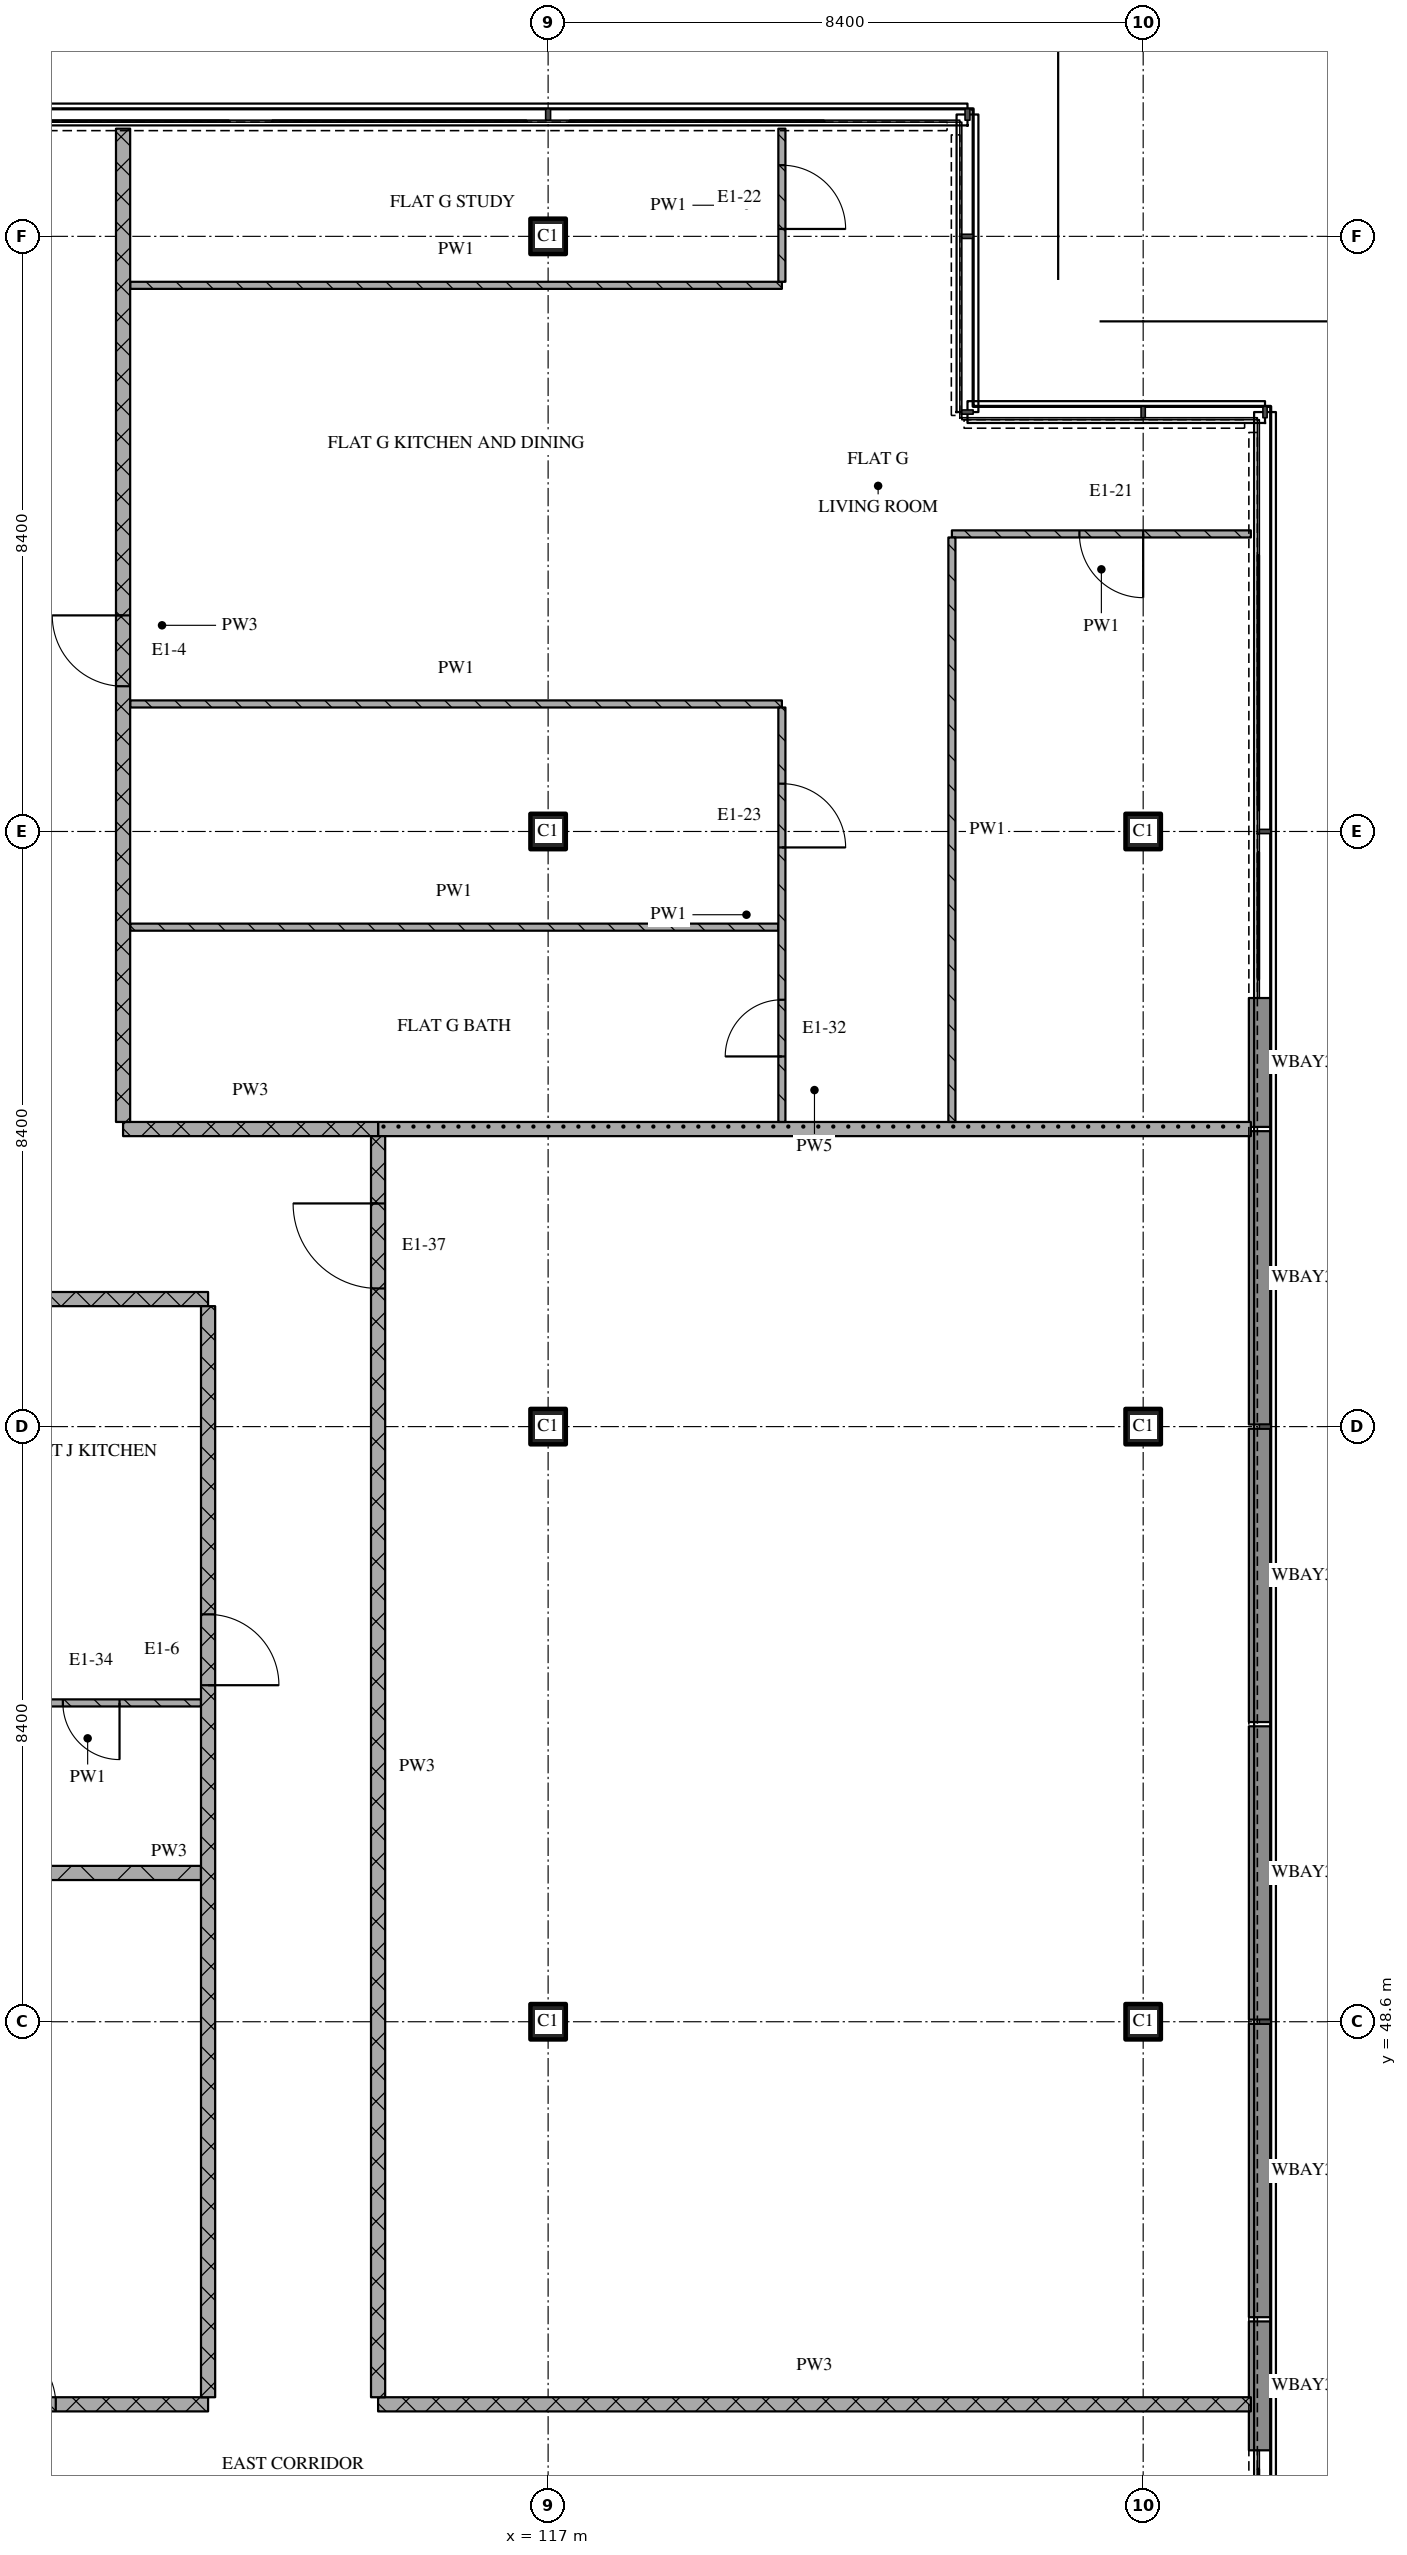
"""IFC4 building model, lengths in metres.
Left out: names, types, materials, properties, quantities, classifications, styles, units other than length and angle.
Written with IfcOpenShell. Run it as: python <this file> out.ifc"""

import sys

from ifc_helpers import new_model, si_unit, direction, frame, frame_2d, origin, origin_2d, place, context, subcontext, project, spatial, rectangle, extrude, element, fill, save


model = new_model("IFC4")
c1 = context("Model", 3, precision=1e-05, world=origin(), true_north=direction((0.0, 1.0)))
c2 = subcontext(c1, "Body", "Model", "MODEL_VIEW")
j1 = project(units=[si_unit("LENGTHUNIT", "METRE"), si_unit("PLANEANGLEUNIT", "RADIAN")], contexts=[c1])
p1 = place(None, origin())
s1 = spatial("IfcSite", under=j1, at=p1, CompositionType="ELEMENT")
p2 = place(p1, origin())
s2 = spatial("IfcBuilding", under=s1, at=p2, CompositionType="ELEMENT")
p3 = place(p2, frame((0.0, 0.0, 263.55)))
s3 = spatial("IfcBuildingStorey", under=s2, at=p3, CompositionType="ELEMENT", Elevation=263.55)
for number, where, z_axis, x_axis in (
    (1, (117.0, 48.6, 0.0), (0.0, 0.0, 1.0), (1.0, 0.0, 0.0)),
    (2, (117.0, 57.0, 0.0), (0.0, 0.0, 1.0), (1.0, 0.0, 0.0)),
    (3, (117.0, 65.4, 0.0), (0.0, 0.0, 1.0), (1.0, 0.0, 0.0)),
    (4, (117.0, 73.8, 0.0), (0.0, 0.0, 1.0), (1.0, 0.0, 0.0)),
    (5, (125.4, 48.6, 0.0), (0.0, 0.0, 1.0), (1.0, 0.0, 0.0)),
    (6, (125.4, 57.0, 0.0), (0.0, 0.0, 1.0), (1.0, 0.0, 0.0)),
    (7, (125.4, 65.4, 0.0), (0.0, 0.0, 1.0), (1.0, 0.0, 0.0)),
):
    element("IfcColumn", number, at=place(p3, frame(where, z_axis=z_axis, x_axis=x_axis)), inside=s3, PredefinedType="COLUMN", context=c2, shape_type="SweptSolid", body=[
        extrude(rectangle(XDim=0.5, YDim=0.5, at=origin_2d()), origin(), (0.0, 0.0, 1.0), 3.6),
    ])
p4 = place(p3, frame((127.046, 44.37, 0.0), z_axis=(0.0, 0.0, 1.0), x_axis=(0.0, -1.0, 0.0)))
e8 = element("IfcWall", 8, at=p4, inside=s3, PredefinedType="SOLIDWALL", context=c2, shape_type="SweptSolid", body=[
    extrude(rectangle(XDim=1.819, YDim=0.308, at=frame_2d((0.91, 0.0))), origin(), (0.0, 0.0, 1.0), 3.2),
])
for number, where, z_axis, x_axis in (
    (9, (127.046, 48.57, 0.0), (0.0, 0.0, 1.0), (0.0, -1.0, 0.0)),
    (10, (127.046, 52.77, 0.0), (0.0, 0.0, 1.0), (0.0, -1.0, 0.0)),
):
    element("IfcWall", number, at=place(p3, frame(where, z_axis=z_axis, x_axis=x_axis)), inside=s3, PredefinedType="SOLIDWALL", context=c2, shape_type="SweptSolid", body=[
        extrude(rectangle(XDim=4.14, YDim=0.308, at=frame_2d((2.07, 0.0))), origin(), (0.0, 0.0, 1.0), 3.2),
    ])
for number, where, z_axis, x_axis in (
    (11, (127.046, 56.97, 0.0), (0.0, 0.0, 1.0), (0.0, -1.0, 0.0)),
    (12, (127.046, 61.17, 0.0), (0.0, 0.0, 1.0), (0.0, -1.0, 0.0)),
):
    element("IfcWall", number, at=place(p3, frame(where, z_axis=z_axis, x_axis=x_axis)), inside=s3, PredefinedType="SOLIDWALL", context=c2, shape_type="SweptSolid", body=[
        extrude(rectangle(XDim=4.14, YDim=0.308, at=frame_2d((2.07, 0.0))), origin(), (0.0, 0.0, 1.0), 3.2),
    ])
p5 = place(p3, frame((127.046, 63.049, 0.0), z_axis=(0.0, 0.0, 1.0), x_axis=(0.0, -1.0, 0.0)))
e13 = element("IfcWall", 13, at=p5, inside=s3, PredefinedType="SOLIDWALL", context=c2, shape_type="SweptSolid", body=[
    extrude(rectangle(XDim=1.819, YDim=0.308, at=frame_2d((0.91, 0.0))), origin(), (0.0, 0.0, 1.0), 3.2),
])
p6 = place(p3, frame((107.0, 43.2, 0.0), z_axis=(0.0, 0.0, 1.0), x_axis=(1.0, 0.0, 0.0)))
e14 = element("IfcWall", 14, at=p6, inside=s3, PredefinedType="PARTITIONING", context=c2, shape_type="SweptSolid", body=[
    extrude(rectangle(XDim=5.2, YDim=0.2, at=frame_2d((2.6, 0.0))), origin(), (0.0, 0.0, 1.0), 3.32),
])
p7 = place(p6, frame((2.15, 0.0, 0.0)))
e15 = element("IfcOpeningElement", 15, at=p7, cuts=e14, PredefinedType="OPENING", context=c2, shape_type="SweptSolid", body=[
    extrude(rectangle(XDim=0.9, YDim=2.1, at=frame_2d((0.45, 1.05))), frame((0.0, 0.11, 0.0), z_axis=(0.0, -1.0, 0.0), x_axis=(1.0, 0.0, 0.0)), (0.0, 0.0, 1.0), 0.22),
])
p8 = place(p3, frame((114.6, 43.2, 0.0), z_axis=(0.0, 0.0, 1.0), x_axis=(1.0, 0.0, 0.0)))
e16 = element("IfcWall", 16, at=p8, inside=s3, PredefinedType="PARTITIONING", context=c2, shape_type="SweptSolid", body=[
    extrude(rectangle(XDim=12.32, YDim=0.2, at=frame_2d((6.16, 0.0))), origin(), (0.0, 0.0, 1.0), 3.32),
])
p9 = place(p3, frame((107.0, 50.7, 0.0), z_axis=(0.0, 0.0, 1.0), x_axis=(1.0, 0.0, 0.0)))
e17 = element("IfcWall", 17, at=p9, inside=s3, PredefinedType="PARTITIONING", context=c2, shape_type="SweptSolid", body=[
    extrude(rectangle(XDim=5.1, YDim=0.2, at=frame_2d((2.55, 0.0))), origin(), (0.0, 0.0, 1.0), 3.32),
])
p10 = place(p3, frame((112.1, 53.1, 0.0), z_axis=(0.0, 0.0, 1.0), x_axis=(-1.0, 0.0, 0.0)))
e18 = element("IfcWall", 18, at=p10, inside=s3, PredefinedType="PARTITIONING", context=c2, shape_type="SweptSolid", body=[
    extrude(rectangle(XDim=3.2, YDim=0.1, at=frame_2d((1.6, 0.0))), origin(), (0.0, 0.0, 1.0), 3.32),
])
p11 = place(p10, frame((1.15, 0.0, 0.0)))
e19 = element("IfcOpeningElement", 19, at=p11, cuts=e18, PredefinedType="OPENING", context=c2, shape_type="SweptSolid", body=[
    extrude(rectangle(XDim=0.8, YDim=2.1, at=frame_2d((0.4, 1.05))), frame((0.0, 0.06, 0.0), z_axis=(0.0, -1.0, 0.0), x_axis=(1.0, 0.0, 0.0)), (0.0, 0.0, 1.0), 0.12),
])
p12 = place(p3, frame((101.4, 58.8, 0.0), z_axis=(0.0, 0.0, 1.0), x_axis=(1.0, 0.0, 0.0)))
e20 = element("IfcWall", 20, at=p12, inside=s3, PredefinedType="PARTITIONING", context=c2, shape_type="SweptSolid", body=[
    extrude(rectangle(XDim=10.8, YDim=0.2, at=frame_2d((5.4, 0.0))), origin(), (0.0, 0.0, 1.0), 3.32),
])
p13 = place(p3, frame((111.0, 61.2, 0.0), z_axis=(0.0, 0.0, 1.0), x_axis=(1.0, 0.0, 0.0)))
e21 = element("IfcWall", 21, at=p13, inside=s3, PredefinedType="PARTITIONING", context=c2, shape_type="SweptSolid", body=[
    extrude(rectangle(XDim=3.6, YDim=0.2, at=frame_2d((1.8, 0.0))), origin(), (0.0, 0.0, 1.0), 3.32),
])
p14 = place(p3, frame((114.6, 61.2, 0.0), z_axis=(0.0, 0.0, 1.0), x_axis=(1.0, 0.0, 0.0)))
e22 = element("IfcWall", 22, at=p14, inside=s3, PredefinedType="PARTITIONING", context=c2, shape_type="SweptSolid", body=[
    extrude(rectangle(XDim=12.32, YDim=0.2, at=frame_2d((6.16, 0.0))), origin(), (0.0, 0.0, 1.0), 3.32),
])
p15 = place(p3, frame((111.1, 64.05, 0.0), z_axis=(0.0, 0.0, 1.0), x_axis=(1.0, 0.0, 0.0)))
e23 = element("IfcWall", 23, at=p15, inside=s3, PredefinedType="PARTITIONING", context=c2, shape_type="SweptSolid", body=[
    extrude(rectangle(XDim=9.15, YDim=0.1, at=frame_2d((4.575, 0.0))), origin(), (0.0, 0.0, 1.0), 3.32),
])
p16 = place(p3, frame((111.1, 67.2, 0.0), z_axis=(0.0, 0.0, 1.0), x_axis=(1.0, 0.0, 0.0)))
e24 = element("IfcWall", 24, at=p16, inside=s3, PredefinedType="PARTITIONING", context=c2, shape_type="SweptSolid", body=[
    extrude(rectangle(XDim=9.2, YDim=0.1, at=frame_2d((4.6, 0.0))), origin(), (0.0, 0.0, 1.0), 3.32),
])
p17 = place(p3, frame((126.92, 69.6, 0.0), z_axis=(0.0, 0.0, 1.0), x_axis=(-1.0, 0.0, 0.0)))
e25 = element("IfcWall", 25, at=p17, inside=s3, PredefinedType="PARTITIONING", context=c2, shape_type="SweptSolid", body=[
    extrude(rectangle(XDim=4.22, YDim=0.1, at=frame_2d((2.11, 0.0))), origin(), (0.0, 0.0, 1.0), 3.32),
])
p18 = place(p17, frame((1.52, 0.0, 0.0)))
e26 = element("IfcOpeningElement", 26, at=p18, cuts=e25, PredefinedType="OPENING", context=c2, shape_type="SweptSolid", body=[
    extrude(rectangle(XDim=0.9, YDim=2.1, at=frame_2d((0.45, 1.05))), frame((0.0, 0.06, 0.0), z_axis=(0.0, -1.0, 0.0), x_axis=(1.0, 0.0, 0.0)), (0.0, 0.0, 1.0), 0.12),
])
p19 = place(p3, frame((111.1, 73.109, 0.0), z_axis=(0.0, 0.0, 1.0), x_axis=(1.0, 0.0, 0.0)))
e27 = element("IfcWall", 27, at=p19, inside=s3, PredefinedType="PARTITIONING", context=c2, shape_type="SweptSolid", body=[
    extrude(rectangle(XDim=9.2, YDim=0.1, at=frame_2d((4.6, 0.0))), origin(), (0.0, 0.0, 1.0), 3.32),
])
p20 = place(p3, frame((111.0, 75.32, 0.0), z_axis=(0.0, 0.0, 1.0), x_axis=(0.0, -1.0, 0.0)))
e28 = element("IfcWall", 28, at=p20, inside=s3, PredefinedType="PARTITIONING", context=c2, shape_type="SweptSolid", body=[
    extrude(rectangle(XDim=14.02, YDim=0.2, at=frame_2d((7.01, 0.0))), origin(), (0.0, 0.0, 1.0), 3.32),
])
p21 = place(p20, frame((6.87, 0.0, 0.0)))
e29 = element("IfcOpeningElement", 29, at=p21, cuts=e28, PredefinedType="OPENING", context=c2, shape_type="SweptSolid", body=[
    extrude(rectangle(XDim=1.0, YDim=2.1, at=frame_2d((0.5, 1.05))), frame((0.0, 0.11, 0.0), z_axis=(0.0, -1.0, 0.0), x_axis=(1.0, 0.0, 0.0)), (0.0, 0.0, 1.0), 0.22),
])
p22 = place(p3, frame((112.2, 43.3, 0.0), z_axis=(0.0, 0.0, 1.0), x_axis=(0.0, 1.0, 0.0)))
e30 = element("IfcWall", 30, at=p22, inside=s3, PredefinedType="PARTITIONING", context=c2, shape_type="SweptSolid", body=[
    extrude(rectangle(XDim=15.4, YDim=0.2, at=frame_2d((7.7, 0.0))), origin(), (0.0, 0.0, 1.0), 3.32),
])
p23 = place(p22, frame((10.05, 0.0, 0.0)))
e31 = element("IfcOpeningElement", 31, at=p23, cuts=e30, PredefinedType="OPENING", context=c2, shape_type="SweptSolid", body=[
    extrude(rectangle(XDim=1.0, YDim=2.1, at=frame_2d((0.5, 1.05))), frame((0.0, 0.11, 0.0), z_axis=(0.0, -1.0, 0.0), x_axis=(1.0, 0.0, 0.0)), (0.0, 0.0, 1.0), 0.22),
])
p24 = place(p3, frame((114.6, 61.1, 0.0), z_axis=(0.0, 0.0, 1.0), x_axis=(0.0, -1.0, 0.0)))
e32 = element("IfcWall", 32, at=p24, inside=s3, PredefinedType="PARTITIONING", context=c2, shape_type="SweptSolid", body=[
    extrude(rectangle(XDim=17.8, YDim=0.2, at=frame_2d((8.9, 0.0))), origin(), (0.0, 0.0, 1.0), 3.32),
])
p25 = place(p24, frame((0.95, 0.0, 0.0)))
e33 = element("IfcOpeningElement", 33, at=p25, cuts=e32, PredefinedType="OPENING", context=c2, shape_type="SweptSolid", body=[
    extrude(rectangle(XDim=1.2, YDim=2.1, at=frame_2d((0.6, 1.05))), frame((0.0, 0.11, 0.0), z_axis=(0.0, -1.0, 0.0), x_axis=(1.0, 0.0, 0.0)), (0.0, 0.0, 1.0), 0.22),
])
p26 = place(p3, frame((120.3, 61.3, 0.0), z_axis=(0.0, 0.0, 1.0), x_axis=(0.0, 1.0, 0.0)))
e34 = element("IfcWall", 34, at=p26, inside=s3, PredefinedType="PARTITIONING", context=c2, shape_type="SweptSolid", body=[
    extrude(rectangle(XDim=5.85, YDim=0.1, at=frame_2d((2.925, 0.0))), origin(), (0.0, 0.0, 1.0), 3.32),
])
p27 = place(p26, frame((0.925, 0.0, 0.0)))
e35 = element("IfcOpeningElement", 35, at=p27, cuts=e34, PredefinedType="OPENING", context=c2, shape_type="SweptSolid", body=[
    extrude(rectangle(XDim=0.8, YDim=2.1, at=frame_2d((0.4, 1.05))), frame((0.0, 0.06, 0.0), z_axis=(0.0, -1.0, 0.0), x_axis=(1.0, 0.0, 0.0)), (0.0, 0.0, 1.0), 0.12),
])
p28 = place(p26, frame((3.875, 0.0, 0.0)))
e36 = element("IfcOpeningElement", 36, at=p28, cuts=e34, PredefinedType="OPENING", context=c2, shape_type="SweptSolid", body=[
    extrude(rectangle(XDim=0.9, YDim=2.1, at=frame_2d((0.45, 1.05))), frame((0.0, 0.06, 0.0), z_axis=(0.0, -1.0, 0.0), x_axis=(1.0, 0.0, 0.0)), (0.0, 0.0, 1.0), 0.12),
])
p29 = place(p3, frame((120.3, 73.159, 0.0), z_axis=(0.0, 0.0, 1.0), x_axis=(0.0, 1.0, 0.0)))
e37 = element("IfcWall", 37, at=p29, inside=s3, PredefinedType="PARTITIONING", context=c2, shape_type="SweptSolid", body=[
    extrude(rectangle(XDim=2.161, YDim=0.1, at=frame_2d((1.081, 0.0))), origin(), (0.0, 0.0, 1.0), 3.32),
])
p30 = place(p29, frame((0.746, 0.0, 0.0)))
e38 = element("IfcOpeningElement", 38, at=p30, cuts=e37, PredefinedType="OPENING", context=c2, shape_type="SweptSolid", body=[
    extrude(rectangle(XDim=0.9, YDim=2.1, at=frame_2d((0.45, 1.05))), frame((0.0, 0.06, 0.0), z_axis=(0.0, -1.0, 0.0), x_axis=(1.0, 0.0, 0.0)), (0.0, 0.0, 1.0), 0.12),
])
p31 = place(p3, frame((122.7, 69.55, 0.0), z_axis=(0.0, 0.0, 1.0), x_axis=(0.0, -1.0, 0.0)))
e39 = element("IfcWall", 39, at=p31, inside=s3, PredefinedType="PARTITIONING", context=c2, shape_type="SweptSolid", body=[
    extrude(rectangle(XDim=8.25, YDim=0.1, at=frame_2d((4.125, 0.0))), origin(), (0.0, 0.0, 1.0), 3.32),
])
p32 = place(p7, origin())
e40 = element("IfcDoor", 40, at=p32, inside=s3, OperationType="SINGLE_SWING_LEFT", PredefinedType="DOOR", context=c2, shape_type="SweptSolid", body=[
    extrude(rectangle(XDim=0.9, YDim=2.1, at=frame_2d((0.45, 1.05))), frame((0.0, 0.025, 0.0), z_axis=(0.0, -1.0, 0.0), x_axis=(1.0, 0.0, 0.0)), (0.0, 0.0, 1.0), 0.05),
])
fill(e15, e40)
p33 = place(p11, origin())
e41 = element("IfcDoor", 41, at=p33, inside=s3, OperationType="SINGLE_SWING_LEFT", PredefinedType="DOOR", context=c2, shape_type="SweptSolid", body=[
    extrude(rectangle(XDim=0.8, YDim=2.1, at=frame_2d((0.4, 1.05))), frame((0.0, 0.025, 0.0), z_axis=(0.0, -1.0, 0.0), x_axis=(1.0, 0.0, 0.0)), (0.0, 0.0, 1.0), 0.05),
])
fill(e19, e41)
p34 = place(p18, origin())
e42 = element("IfcDoor", 42, at=p34, inside=s3, OperationType="SINGLE_SWING_LEFT", PredefinedType="DOOR", context=c2, shape_type="SweptSolid", body=[
    extrude(rectangle(XDim=0.9, YDim=2.1, at=frame_2d((0.45, 1.05))), frame((0.0, 0.025, 0.0), z_axis=(0.0, -1.0, 0.0), x_axis=(1.0, 0.0, 0.0)), (0.0, 0.0, 1.0), 0.05),
])
fill(e26, e42)
p35 = place(p21, origin())
e43 = element("IfcDoor", 43, at=p35, inside=s3, OperationType="SINGLE_SWING_RIGHT", PredefinedType="DOOR", context=c2, shape_type="SweptSolid", body=[
    extrude(rectangle(XDim=1.0, YDim=2.1, at=frame_2d((0.5, 1.05))), frame((0.0, 0.025, 0.0), z_axis=(0.0, -1.0, 0.0), x_axis=(1.0, 0.0, 0.0)), (0.0, 0.0, 1.0), 0.05),
])
fill(e29, e43)
p36 = place(p23, origin())
e44 = element("IfcDoor", 44, at=p36, inside=s3, OperationType="SINGLE_SWING_RIGHT", PredefinedType="DOOR", context=c2, shape_type="SweptSolid", body=[
    extrude(rectangle(XDim=1.0, YDim=2.1, at=frame_2d((0.5, 1.05))), frame((0.0, 0.025, 0.0), z_axis=(0.0, -1.0, 0.0), x_axis=(1.0, 0.0, 0.0)), (0.0, 0.0, 1.0), 0.05),
])
fill(e31, e44)
p37 = place(p25, origin())
e45 = element("IfcDoor", 45, at=p37, inside=s3, OperationType="SINGLE_SWING_RIGHT", PredefinedType="DOOR", context=c2, shape_type="SweptSolid", body=[
    extrude(rectangle(XDim=1.2, YDim=2.1, at=frame_2d((0.6, 1.05))), frame((0.0, 0.025, 0.0), z_axis=(0.0, -1.0, 0.0), x_axis=(1.0, 0.0, 0.0)), (0.0, 0.0, 1.0), 0.05),
])
fill(e33, e45)
p38 = place(p27, origin())
e46 = element("IfcDoor", 46, at=p38, inside=s3, OperationType="SINGLE_SWING_LEFT", PredefinedType="DOOR", context=c2, shape_type="SweptSolid", body=[
    extrude(rectangle(XDim=0.8, YDim=2.1, at=frame_2d((0.4, 1.05))), frame((0.0, 0.025, 0.0), z_axis=(0.0, -1.0, 0.0), x_axis=(1.0, 0.0, 0.0)), (0.0, 0.0, 1.0), 0.05),
])
fill(e35, e46)
p39 = place(p28, origin())
e47 = element("IfcDoor", 47, at=p39, inside=s3, OperationType="SINGLE_SWING_RIGHT", PredefinedType="DOOR", context=c2, shape_type="SweptSolid", body=[
    extrude(rectangle(XDim=0.9, YDim=2.1, at=frame_2d((0.45, 1.05))), frame((0.0, 0.025, 0.0), z_axis=(0.0, -1.0, 0.0), x_axis=(1.0, 0.0, 0.0)), (0.0, 0.0, 1.0), 0.05),
])
fill(e36, e47)
p40 = place(p30, origin())
e48 = element("IfcDoor", 48, at=p40, inside=s3, OperationType="SINGLE_SWING_RIGHT", PredefinedType="DOOR", context=c2, shape_type="SweptSolid", body=[
    extrude(rectangle(XDim=0.9, YDim=2.1, at=frame_2d((0.45, 1.05))), frame((0.0, 0.025, 0.0), z_axis=(0.0, -1.0, 0.0), x_axis=(1.0, 0.0, 0.0)), (0.0, 0.0, 1.0), 0.05),
])
fill(e38, e48)
save(model, sys.argv[1])
